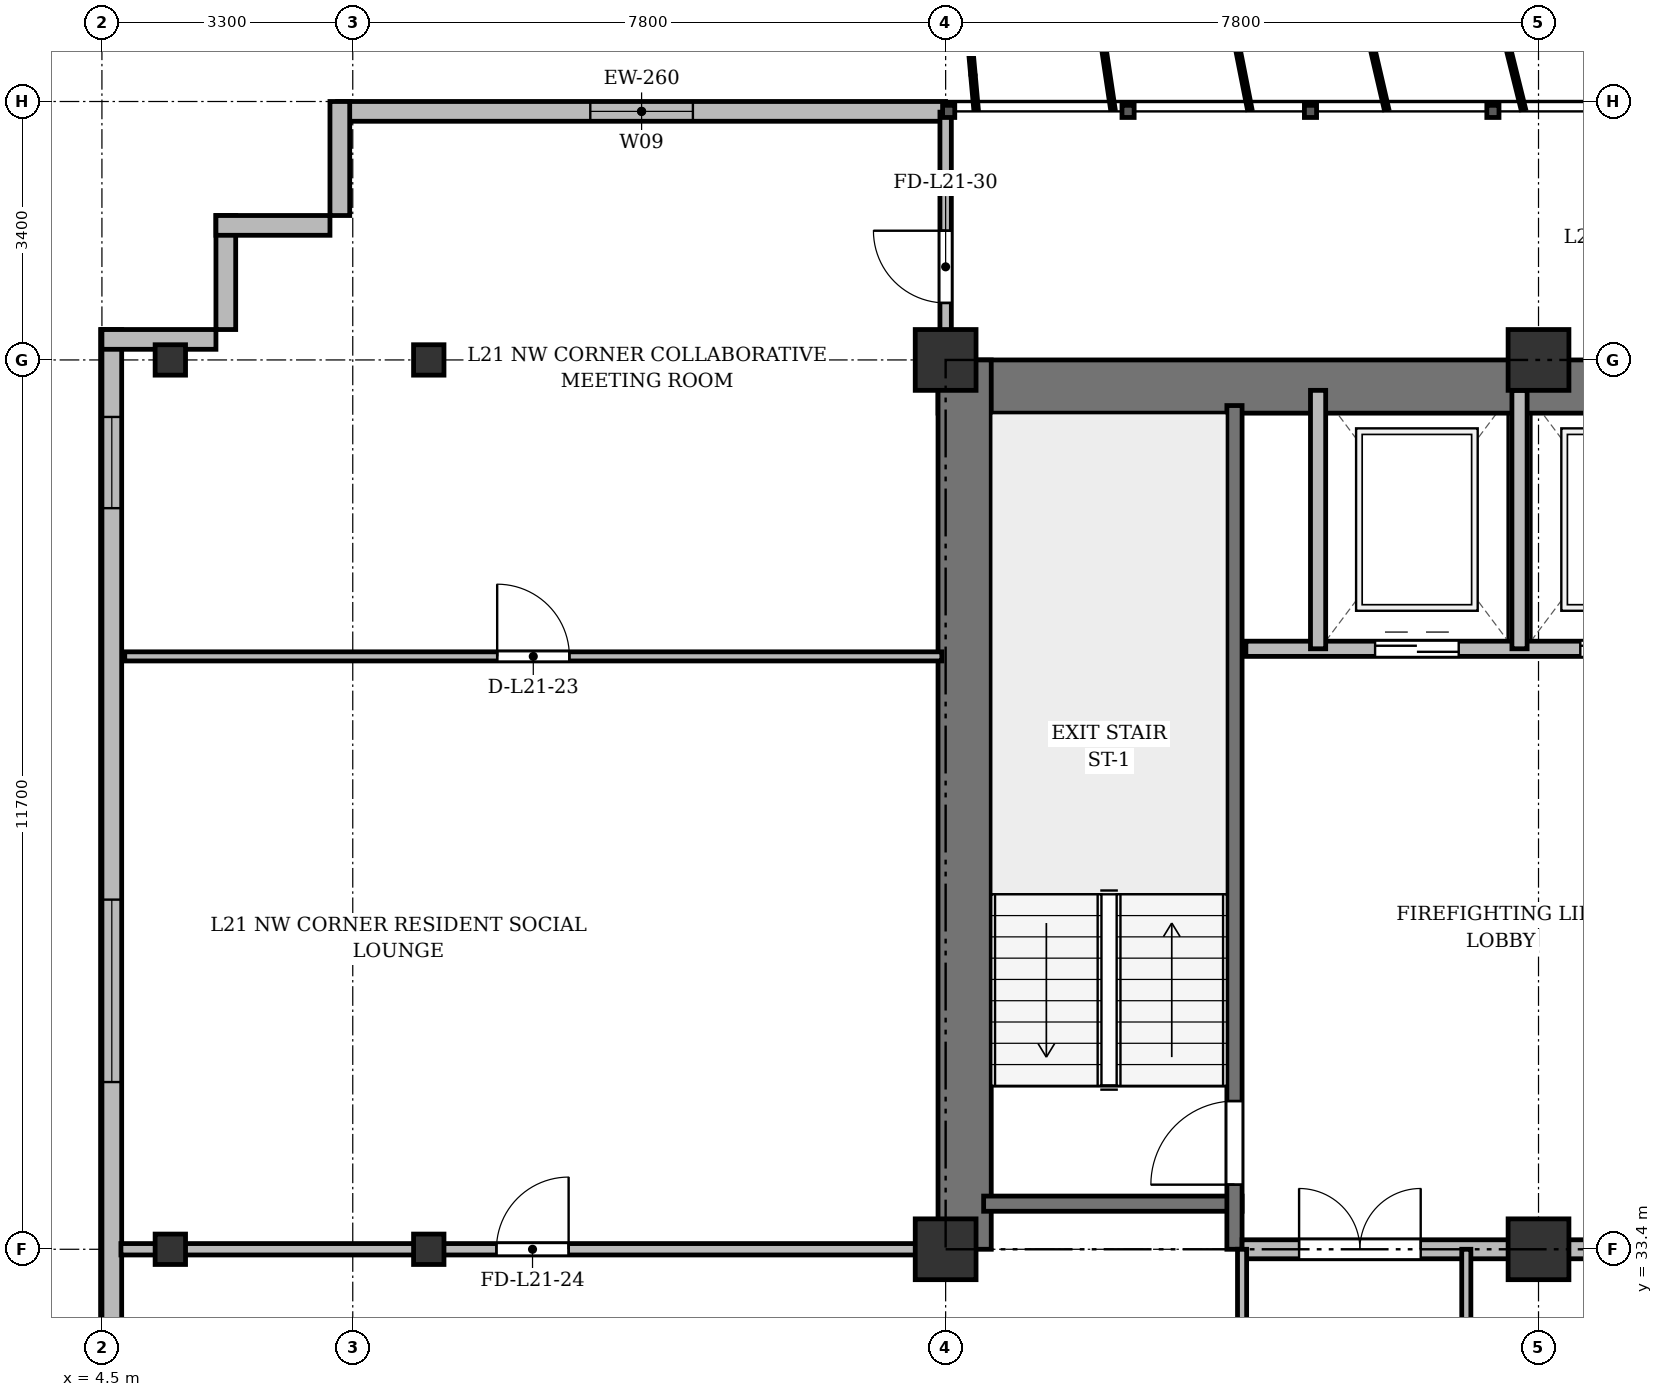
"""IFC4 building model, lengths in metres.
Left out: names, types, materials, properties, quantities, classifications, styles, units other than length and angle.
Written with IfcOpenShell. Run it as: python <this file> out.ifc"""

import sys

from ifc_helpers import new_model, si_unit, direction, frame, frame_2d, origin, origin_2d, place, context, subcontext, project, spatial, rectangle, i_section, extrude, source, transform, mapped, element, fill, save


model = new_model("IFC4")
c1 = context("Model", 3, precision=1e-05, world=origin(), true_north=direction((0.0, 1.0)))
c2 = subcontext(c1, "Body", "Model", "MODEL_VIEW")
j1 = project(units=[si_unit("LENGTHUNIT", "METRE"), si_unit("PLANEANGLEUNIT", "RADIAN")], contexts=[c1])
p1 = place(None, origin())
s1 = spatial("IfcSite", under=j1, at=p1, CompositionType="ELEMENT")
p2 = place(p1, origin())
s2 = spatial("IfcBuilding", under=s1, at=p2, CompositionType="ELEMENT")
p3 = place(p2, frame((0.0, 0.0, 85.3)))
s3 = spatial("IfcBuildingStorey", under=s2, at=p3, CompositionType="ELEMENT", Elevation=85.3)
m1 = source(origin(), c2, "Body", "SweptSolid", [
    extrude(i_section(OverallWidth=0.4, OverallDepth=0.4, WebThickness=0.022, FlangeThickness=0.035, at=origin_2d()), origin(), (0.0, 0.0, 1.0), 3.6),
])
for number, where, z_axis, x_axis in (
    (1, (5.4, 33.4, 0.0), (0.0, 0.0, 1.0), (1.0, 0.0, 0.0)),
    (2, (5.4, 45.1, 0.0), (0.0, 0.0, 1.0), (1.0, 0.0, 0.0)),
    (3, (8.8, 33.4, 0.0), (0.0, 0.0, 1.0), (1.0, 0.0, 0.0)),
    (4, (8.8, 45.1, 0.0), (0.0, 0.0, 1.0), (1.0, 0.0, 0.0)),
):
    element("IfcColumn", number, at=place(p3, frame(where, z_axis=z_axis, x_axis=x_axis)), inside=s3, PredefinedType="COLUMN", context=c2, shape_type="MappedRepresentation", body=[
        mapped(m1, transform((0.0, 0.0, 0.0), x_axis=(1.0, 0.0, 0.0), y_axis=(0.0, 1.0, 0.0), z_axis=(0.0, 0.0, 1.0), scale=1.0)),
    ])
m2 = source(origin(), c2, "Body", "SweptSolid", [
    extrude(rectangle(XDim=0.8, YDim=0.8, at=origin_2d()), origin(), (0.0, 0.0, 1.0), 3.6),
])
for number, where, z_axis, x_axis in (
    (5, (15.6, 33.4, 0.0), (0.0, 0.0, 1.0), (1.0, 0.0, 0.0)),
    (6, (15.6, 45.1, 0.0), (0.0, 0.0, 1.0), (1.0, 0.0, 0.0)),
    (7, (23.4, 33.4, 0.0), (0.0, 0.0, 1.0), (1.0, 0.0, 0.0)),
    (8, (23.4, 45.1, 0.0), (0.0, 0.0, 1.0), (1.0, 0.0, 0.0)),
):
    element("IfcColumn", number, at=place(p3, frame(where, z_axis=z_axis, x_axis=x_axis)), inside=s3, PredefinedType="COLUMN", context=c2, shape_type="MappedRepresentation", body=[
        mapped(m2, transform((0.0, 0.0, 0.0), x_axis=(1.0, 0.0, 0.0), y_axis=(0.0, 1.0, 0.0), z_axis=(0.0, 0.0, 1.0), scale=1.0)),
    ])
p4 = place(p3, frame((7.6, 48.37, 0.0), z_axis=(0.0, 0.0, 1.0), x_axis=(1.0, 0.0, 0.0)))
e9 = element("IfcWall", 9, at=p4, inside=s3, PredefinedType="SOLIDWALL", context=c2, shape_type="SweptSolid", body=[
    extrude(rectangle(XDim=8.0, YDim=0.26, at=frame_2d((4.0, 0.0))), origin(), (0.0, 0.0, 1.0), 3.34),
])
p5 = place(p4, frame((3.325, 0.0, 0.9)))
e10 = element("IfcOpeningElement", 10, at=p5, cuts=e9, PredefinedType="OPENING", context=c2, shape_type="SweptSolid", body=[
    extrude(rectangle(XDim=1.35, YDim=1.5, at=frame_2d((0.675, 0.75))), frame((0.0, 0.14, 0.0), z_axis=(0.0, -1.0, 0.0), x_axis=(1.0, 0.0, 0.0)), (0.0, 0.0, 1.0), 0.28),
])
p6 = place(p3, frame((4.63, 5.9, 0.0), z_axis=(0.0, 0.0, 1.0), x_axis=(0.0, 1.0, 0.0)))
e11 = element("IfcWall", 11, at=p6, inside=s3, PredefinedType="SOLIDWALL", context=c2, shape_type="SweptSolid", body=[
    extrude(rectangle(XDim=39.6, YDim=0.26, at=frame_2d((19.8, 0.0))), origin(), (0.0, 0.0, 1.0), 3.34),
])
p7 = place(p6, frame((1.45, 0.0, 0.92)))
e12 = element("IfcOpeningElement", 12, at=p7, cuts=e11, PredefinedType="OPENING", context=c2, shape_type="SweptSolid", body=[
    extrude(rectangle(XDim=1.2, YDim=1.65, at=frame_2d((0.6, 0.825))), frame((0.0, 0.14, 0.0), z_axis=(0.0, -1.0, 0.0), x_axis=(1.0, 0.0, 0.0)), (0.0, 0.0, 1.0), 0.28),
])
p8 = place(p6, frame((4.3, 0.0, 0.92)))
e13 = element("IfcOpeningElement", 13, at=p8, cuts=e11, PredefinedType="OPENING", context=c2, shape_type="SweptSolid", body=[
    extrude(rectangle(XDim=2.4, YDim=2.1, at=frame_2d((1.2, 1.05))), frame((0.0, 0.14, 0.0), z_axis=(0.0, -1.0, 0.0), x_axis=(1.0, 0.0, 0.0)), (0.0, 0.0, 1.0), 0.28),
])
p9 = place(p6, frame((8.5, 0.0, 0.92)))
e14 = element("IfcOpeningElement", 14, at=p9, cuts=e11, PredefinedType="OPENING", context=c2, shape_type="SweptSolid", body=[
    extrude(rectangle(XDim=2.4, YDim=2.1, at=frame_2d((1.2, 1.05))), frame((0.0, 0.14, 0.0), z_axis=(0.0, -1.0, 0.0), x_axis=(1.0, 0.0, 0.0)), (0.0, 0.0, 1.0), 0.28),
])
p10 = place(p6, frame((15.7, 0.0, 0.92)))
e15 = element("IfcOpeningElement", 15, at=p10, cuts=e11, PredefinedType="OPENING", context=c2, shape_type="SweptSolid", body=[
    extrude(rectangle(XDim=2.4, YDim=2.1, at=frame_2d((1.2, 1.05))), frame((0.0, 0.14, 0.0), z_axis=(0.0, -1.0, 0.0), x_axis=(1.0, 0.0, 0.0)), (0.0, 0.0, 1.0), 0.28),
])
p11 = place(p6, frame((29.7, 0.0, 0.92)))
e16 = element("IfcOpeningElement", 16, at=p11, cuts=e11, PredefinedType="OPENING", context=c2, shape_type="SweptSolid", body=[
    extrude(rectangle(XDim=2.4, YDim=2.1, at=frame_2d((1.2, 1.05))), frame((0.0, 0.14, 0.0), z_axis=(0.0, -1.0, 0.0), x_axis=(1.0, 0.0, 0.0)), (0.0, 0.0, 1.0), 0.28),
])
p12 = place(p6, frame((37.25, 0.0, 0.92)))
e17 = element("IfcOpeningElement", 17, at=p12, cuts=e11, PredefinedType="OPENING", context=c2, shape_type="SweptSolid", body=[
    extrude(rectangle(XDim=1.2, YDim=1.65, at=frame_2d((0.6, 0.825))), frame((0.0, 0.14, 0.0), z_axis=(0.0, -1.0, 0.0), x_axis=(1.0, 0.0, 0.0)), (0.0, 0.0, 1.0), 0.28),
])
p13 = place(p3, frame((4.5, 45.37, 0.0), z_axis=(0.0, 0.0, 1.0), x_axis=(1.0, 0.0, 0.0)))
e18 = element("IfcWall", 18, at=p13, inside=s3, PredefinedType="SOLIDWALL", context=c2, shape_type="SweptSolid", body=[
    extrude(rectangle(XDim=1.5, YDim=0.26, at=frame_2d((0.75, 0.0))), origin(), (0.0, 0.0, 1.0), 2.752),
])
for number, where, z_axis, x_axis in (
    (19, (6.13, 45.5, 0.0), (0.0, 0.0, 1.0), (0.0, 1.0, 0.0)),
    (20, (6.0, 46.87, 0.0), (0.0, 0.0, 1.0), (1.0, 0.0, 0.0)),
    (21, (7.63, 47.0, 0.0), (0.0, 0.0, 1.0), (0.0, 1.0, 0.0)),
):
    element("IfcWall", number, at=place(p3, frame(where, z_axis=z_axis, x_axis=x_axis)), inside=s3, PredefinedType="SOLIDWALL", context=c2, shape_type="SweptSolid", body=[
        extrude(rectangle(XDim=1.5, YDim=0.26, at=frame_2d((0.75, 0.0))), origin(), (0.0, 0.0, 1.0), 3.34),
    ])
p14 = place(p3, frame((15.5, 44.75, 0.0), z_axis=(0.0, 0.0, 1.0), x_axis=(1.0, 0.0, 0.0)))
e22 = element("IfcWall", 22, at=p14, inside=s3, PredefinedType="SHEAR", context=c2, shape_type="SweptSolid", body=[
    extrude(rectangle(XDim=43.4, YDim=0.7, at=frame_2d((21.7, 0.0))), origin(), (0.0, 0.0, 1.0), 3.34),
])
p15 = place(p3, frame((15.85, 33.4, 0.0), z_axis=(0.0, 0.0, 1.0), x_axis=(0.0, 1.0, 0.0)))
e23 = element("IfcWall", 23, at=p15, inside=s3, PredefinedType="SHEAR", context=c2, shape_type="SweptSolid", body=[
    extrude(rectangle(XDim=11.7, YDim=0.7, at=frame_2d((5.85, 0.0))), origin(), (0.0, 0.0, 1.0), 3.34),
])
p16 = place(p3, frame((16.1, 34.0, 0.0), z_axis=(0.0, 0.0, 1.0), x_axis=(1.0, 0.0, 0.0)))
e24 = element("IfcWall", 24, at=p16, inside=s3, PredefinedType="SHEAR", context=c2, shape_type="SweptSolid", body=[
    extrude(rectangle(XDim=3.4, YDim=0.2, at=frame_2d((1.7, 0.0))), origin(), (0.0, 0.0, 1.0), 3.34),
])
p17 = place(p3, frame((19.4, 33.4, 0.0), z_axis=(0.0, 0.0, 1.0), x_axis=(0.0, 1.0, 0.0)))
e25 = element("IfcWall", 25, at=p17, inside=s3, PredefinedType="SHEAR", context=c2, shape_type="SweptSolid", body=[
    extrude(rectangle(XDim=11.1, YDim=0.2, at=frame_2d((5.55, 0.0))), origin(), (0.0, 0.0, 1.0), 3.34),
])
p18 = place(p17, frame((0.85, 0.0, 0.0)))
e26 = element("IfcOpeningElement", 26, at=p18, cuts=e25, PredefinedType="OPENING", context=c2, shape_type="SweptSolid", body=[
    extrude(rectangle(XDim=1.1, YDim=2.15, at=frame_2d((0.55, 1.075))), frame((0.0, 0.11, 0.0), z_axis=(0.0, -1.0, 0.0), x_axis=(1.0, 0.0, 0.0)), (0.0, 0.0, 1.0), 0.22),
])
p19 = place(p3, frame((19.55, 41.3, 0.0), z_axis=(0.0, 0.0, 1.0), x_axis=(1.0, 0.0, 0.0)))
e27 = element("IfcWall", 27, at=p19, inside=s3, PredefinedType="SOLIDWALL", context=c2, shape_type="SweptSolid", body=[
    extrude(rectangle(XDim=6.75, YDim=0.2, at=frame_2d((3.375, 0.0))), origin(), (0.0, 0.0, 1.0), 3.34),
])
p20 = place(p19, frame((1.7, 0.0, 0.0)))
e28 = element("IfcOpeningElement", 28, at=p20, cuts=e27, PredefinedType="OPENING", context=c2, shape_type="SweptSolid", body=[
    extrude(rectangle(XDim=1.1, YDim=2.15, at=frame_2d((0.55, 1.075))), frame((0.0, 0.11, 0.0), z_axis=(0.0, -1.0, 0.0), x_axis=(1.0, 0.0, 0.0)), (0.0, 0.0, 1.0), 0.22),
])
p21 = place(p19, frame((4.4, 0.0, 0.0)))
e29 = element("IfcOpeningElement", 29, at=p21, cuts=e27, PredefinedType="OPENING", context=c2, shape_type="SweptSolid", body=[
    extrude(rectangle(XDim=1.1, YDim=2.15, at=frame_2d((0.55, 1.075))), frame((0.0, 0.11, 0.0), z_axis=(0.0, -1.0, 0.0), x_axis=(1.0, 0.0, 0.0)), (0.0, 0.0, 1.0), 0.22),
])
for number, where, z_axis, x_axis in (
    (30, (20.5, 41.3, 0.0), (0.0, 0.0, 1.0), (0.0, 1.0, 0.0)),
    (31, (23.15, 41.3, 0.0), (0.0, 0.0, 1.0), (0.0, 1.0, 0.0)),
):
    element("IfcWall", number, at=place(p3, frame(where, z_axis=z_axis, x_axis=x_axis)), inside=s3, PredefinedType="SOLIDWALL", context=c2, shape_type="SweptSolid", body=[
        extrude(rectangle(XDim=3.4, YDim=0.2, at=frame_2d((1.7, 0.0))), origin(), (0.0, 0.0, 1.0), 3.34),
    ])
p22 = place(p3, frame((19.5, 33.4, 0.0), z_axis=(0.0, 0.0, 1.0), x_axis=(1.0, 0.0, 0.0)))
e32 = element("IfcWall", 32, at=p22, inside=s3, PredefinedType="PARTITIONING", context=c2, shape_type="SweptSolid", body=[
    extrude(rectangle(XDim=6.8, YDim=0.25, at=frame_2d((3.4, 0.0))), origin(), (0.0, 0.0, 1.0), 2.752),
])
p23 = place(p22, frame((0.75, 0.0, 0.0)))
e33 = element("IfcOpeningElement", 33, at=p23, cuts=e32, PredefinedType="OPENING", context=c2, shape_type="SweptSolid", body=[
    extrude(rectangle(XDim=1.6, YDim=2.2, at=frame_2d((0.8, 1.1))), frame((0.0, 0.135, 0.0), z_axis=(0.0, -1.0, 0.0), x_axis=(1.0, 0.0, 0.0)), (0.0, 0.0, 1.0), 0.27),
])
for number, where, z_axis, x_axis in (
    (34, (19.5, 29.8, 0.0), (0.0, 0.0, 1.0), (0.0, 1.0, 0.0)),
    (35, (22.45, 29.8, 0.0), (0.0, 0.0, 1.0), (0.0, 1.0, 0.0)),
):
    element("IfcWall", number, at=place(p3, frame(where, z_axis=z_axis, x_axis=x_axis)), inside=s3, PredefinedType="PARTITIONING", context=c2, shape_type="SweptSolid", body=[
        extrude(rectangle(XDim=3.6, YDim=0.12, at=frame_2d((1.8, 0.0))), origin(), (0.0, 0.0, 1.0), 2.752),
    ])
p24 = place(p3, frame((4.8, 41.2, 0.0), z_axis=(0.0, 0.0, 1.0), x_axis=(1.0, 0.0, 0.0)))
e36 = element("IfcWall", 36, at=p24, inside=s3, PredefinedType="PARTITIONING", context=c2, shape_type="SweptSolid", body=[
    extrude(rectangle(XDim=10.75, YDim=0.12, at=frame_2d((5.375, 0.0))), origin(), (0.0, 0.0, 1.0), 2.84),
])
p25 = place(p24, frame((4.9, 0.0, 0.0)))
e37 = element("IfcOpeningElement", 37, at=p25, cuts=e36, PredefinedType="OPENING", context=c2, shape_type="SweptSolid", body=[
    extrude(rectangle(XDim=0.95, YDim=2.15, at=frame_2d((0.475, 1.075))), frame((0.0, 0.07, 0.0), z_axis=(0.0, -1.0, 0.0), x_axis=(1.0, 0.0, 0.0)), (0.0, 0.0, 1.0), 0.14),
])
p26 = place(p3, frame((4.75, 33.4, 0.0), z_axis=(0.0, 0.0, 1.0), x_axis=(1.0, 0.0, 0.0)))
e38 = element("IfcWall", 38, at=p26, inside=s3, PredefinedType="PARTITIONING", context=c2, shape_type="SweptSolid", body=[
    extrude(rectangle(XDim=10.85, YDim=0.15, at=frame_2d((5.425, 0.0))), origin(), (0.0, 0.0, 1.0), 2.752),
])
p27 = place(p26, frame((4.94, 0.0, 0.0)))
e39 = element("IfcOpeningElement", 39, at=p27, cuts=e38, PredefinedType="OPENING", context=c2, shape_type="SweptSolid", body=[
    extrude(rectangle(XDim=0.95, YDim=2.15, at=frame_2d((0.475, 1.075))), frame((0.0, 0.085, 0.0), z_axis=(0.0, -1.0, 0.0), x_axis=(1.0, 0.0, 0.0)), (0.0, 0.0, 1.0), 0.17),
])
p28 = place(p3, frame((15.6, 44.75, 0.0), z_axis=(0.0, 0.0, 1.0), x_axis=(0.0, 1.0, 0.0)))
e40 = element("IfcWall", 40, at=p28, inside=s3, PredefinedType="PARTITIONING", context=c2, shape_type="SweptSolid", body=[
    extrude(rectangle(XDim=3.61, YDim=0.15, at=frame_2d((1.805, 0.0))), origin(), (0.0, 0.0, 1.0), 2.84),
])
p29 = place(p28, frame((1.1, 0.0, 0.0)))
e41 = element("IfcOpeningElement", 41, at=p29, cuts=e40, PredefinedType="OPENING", context=c2, shape_type="SweptSolid", body=[
    extrude(rectangle(XDim=0.95, YDim=2.15, at=frame_2d((0.475, 1.075))), frame((0.0, 0.085, 0.0), z_axis=(0.0, -1.0, 0.0), x_axis=(1.0, 0.0, 0.0)), (0.0, 0.0, 1.0), 0.17),
])
m3 = source(origin(), c2, "Body", "SweptSolid", [
    extrude(rectangle(XDim=1.35, YDim=1.5, at=frame_2d((0.675, 0.75))), frame((0.0, 0.03, 0.0), z_axis=(0.0, -1.0, 0.0), x_axis=(1.0, 0.0, 0.0)), (0.0, 0.0, 1.0), 0.06),
])
p30 = place(p5, origin())
e42 = element("IfcWindow", 42, at=p30, inside=s3, PartitioningType="SINGLE_PANEL", PredefinedType="WINDOW", context=c2, shape_type="MappedRepresentation", body=[
    mapped(m3, transform((0.0, 0.0, 0.0), x_axis=(1.0, 0.0, 0.0), y_axis=(0.0, 1.0, 0.0), z_axis=(0.0, 0.0, 1.0), scale=1.0)),
])
fill(e10, e42)
m4 = source(origin(), c2, "Body", "SweptSolid", [
    extrude(rectangle(XDim=2.4, YDim=2.1, at=frame_2d((1.2, 1.05))), frame((0.0, 0.03, 0.0), z_axis=(0.0, -1.0, 0.0), x_axis=(1.0, 0.0, 0.0)), (0.0, 0.0, 1.0), 0.06),
])
p31 = place(p11, origin())
e43 = element("IfcWindow", 43, at=p31, inside=s3, PartitioningType="SINGLE_PANEL", PredefinedType="WINDOW", context=c2, shape_type="MappedRepresentation", body=[
    mapped(m4, transform((0.0, 0.0, 0.0), x_axis=(1.0, 0.0, 0.0), y_axis=(0.0, 1.0, 0.0), z_axis=(0.0, 0.0, 1.0), scale=1.0)),
])
fill(e16, e43)
m5 = source(origin(), c2, "Body", "SweptSolid", [
    extrude(rectangle(XDim=1.2, YDim=1.65, at=frame_2d((0.6, 0.825))), frame((0.0, 0.03, 0.0), z_axis=(0.0, -1.0, 0.0), x_axis=(1.0, 0.0, 0.0)), (0.0, 0.0, 1.0), 0.06),
])
p32 = place(p12, origin())
e44 = element("IfcWindow", 44, at=p32, inside=s3, PartitioningType="SINGLE_PANEL", PredefinedType="WINDOW", context=c2, shape_type="MappedRepresentation", body=[
    mapped(m5, transform((0.0, 0.0, 0.0), x_axis=(1.0, 0.0, 0.0), y_axis=(0.0, 1.0, 0.0), z_axis=(0.0, 0.0, 1.0), scale=1.0)),
])
fill(e17, e44)
m6 = source(origin(), c2, "Body", "SweptSolid", [
    extrude(rectangle(XDim=1.1, YDim=2.15, at=frame_2d((0.55, 1.075))), frame((0.0, 0.025, 0.0), z_axis=(0.0, -1.0, 0.0), x_axis=(1.0, 0.0, 0.0)), (0.0, 0.0, 1.0), 0.05),
])
p33 = place(p18, origin())
e45 = element("IfcDoor", 45, at=p33, inside=s3, OperationType="SINGLE_SWING_LEFT", PredefinedType="DOOR", context=c2, shape_type="MappedRepresentation", body=[
    mapped(m6, transform((0.0, 0.0, 0.0), x_axis=(1.0, 0.0, 0.0), y_axis=(0.0, 1.0, 0.0), z_axis=(0.0, 0.0, 1.0), scale=1.0)),
])
fill(e26, e45)
p34 = place(p20, origin())
e46 = element("IfcDoor", 46, at=p34, inside=s3, OperationType="DOUBLE_DOOR_SLIDING", PredefinedType="DOOR", context=c2, shape_type="MappedRepresentation", body=[
    mapped(m6, transform((0.0, 0.0, 0.0), x_axis=(1.0, 0.0, 0.0), y_axis=(0.0, 1.0, 0.0), z_axis=(0.0, 0.0, 1.0), scale=1.0)),
])
fill(e28, e46)
p35 = place(p21, origin())
e47 = element("IfcDoor", 47, at=p35, inside=s3, OperationType="DOUBLE_DOOR_SLIDING", PredefinedType="DOOR", context=c2, shape_type="MappedRepresentation", body=[
    mapped(m6, transform((0.0, 0.0, 0.0), x_axis=(1.0, 0.0, 0.0), y_axis=(0.0, 1.0, 0.0), z_axis=(0.0, 0.0, 1.0), scale=1.0)),
])
fill(e29, e47)
m7 = source(origin(), c2, "Body", "SweptSolid", [
    extrude(rectangle(XDim=1.6, YDim=2.2, at=frame_2d((0.8, 1.1))), frame((0.0, 0.025, 0.0), z_axis=(0.0, -1.0, 0.0), x_axis=(1.0, 0.0, 0.0)), (0.0, 0.0, 1.0), 0.05),
])
p36 = place(p23, origin())
e48 = element("IfcDoor", 48, at=p36, inside=s3, OperationType="DOUBLE_DOOR_SINGLE_SWING", PredefinedType="DOOR", context=c2, shape_type="MappedRepresentation", body=[
    mapped(m7, transform((0.0, 0.0, 0.0), x_axis=(1.0, 0.0, 0.0), y_axis=(0.0, 1.0, 0.0), z_axis=(0.0, 0.0, 1.0), scale=1.0)),
])
fill(e33, e48)
m8 = source(origin(), c2, "Body", "SweptSolid", [
    extrude(rectangle(XDim=0.95, YDim=2.15, at=frame_2d((0.475, 1.075))), frame((0.0, 0.025, 0.0), z_axis=(0.0, -1.0, 0.0), x_axis=(1.0, 0.0, 0.0)), (0.0, 0.0, 1.0), 0.05),
])
p37 = place(p25, origin())
e49 = element("IfcDoor", 49, at=p37, inside=s3, OperationType="SINGLE_SWING_LEFT", PredefinedType="DOOR", context=c2, shape_type="MappedRepresentation", body=[
    mapped(m8, transform((0.0, 0.0, 0.0), x_axis=(1.0, 0.0, 0.0), y_axis=(0.0, 1.0, 0.0), z_axis=(0.0, 0.0, 1.0), scale=1.0)),
])
fill(e37, e49)
p38 = place(p27, origin())
e50 = element("IfcDoor", 50, at=p38, inside=s3, OperationType="SINGLE_SWING_RIGHT", PredefinedType="DOOR", context=c2, shape_type="MappedRepresentation", body=[
    mapped(m8, transform((0.0, 0.0, 0.0), x_axis=(1.0, 0.0, 0.0), y_axis=(0.0, 1.0, 0.0), z_axis=(0.0, 0.0, 1.0), scale=1.0)),
])
fill(e39, e50)
p39 = place(p29, origin())
e51 = element("IfcDoor", 51, at=p39, inside=s3, OperationType="SINGLE_SWING_RIGHT", PredefinedType="DOOR", context=c2, shape_type="MappedRepresentation", body=[
    mapped(m8, transform((0.0, 0.0, 0.0), x_axis=(1.0, 0.0, 0.0), y_axis=(0.0, 1.0, 0.0), z_axis=(0.0, 0.0, 1.0), scale=1.0)),
])
fill(e41, e51)
save(model, sys.argv[1])
